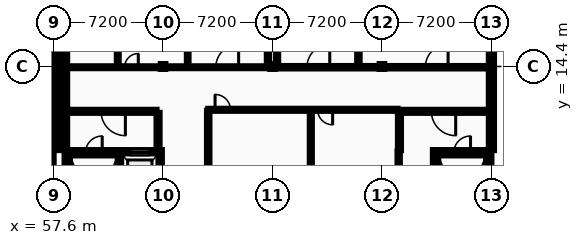
"""IFC4 building model, lengths in metres.
Left out: names, types, materials, properties, quantities, classifications, styles, units other than length and angle.
Written with IfcOpenShell. Run it as: python <this file> out.ifc"""

import sys

from ifc_helpers import new_model, si_unit, direction, frame, frame_2d, origin, origin_2d, place, context, subcontext, project, spatial, rectangle, i_section, extrude, element, fill, save


model = new_model("IFC4")
c1 = context("Model", 3, precision=1e-05, world=origin(), true_north=direction((0.0, 1.0)))
c2 = subcontext(c1, "Body", "Model", "MODEL_VIEW")
j1 = project(units=[si_unit("LENGTHUNIT", "METRE"), si_unit("PLANEANGLEUNIT", "RADIAN")], contexts=[c1])
p1 = place(None, origin())
s1 = spatial("IfcSite", under=j1, at=p1, CompositionType="ELEMENT")
p2 = place(p1, origin())
s2 = spatial("IfcBuilding", under=s1, at=p2, CompositionType="ELEMENT")
p3 = place(p2, frame((0.0, 0.0, 14.0)))
s3 = spatial("IfcBuildingStorey", under=s2, at=p3, CompositionType="ELEMENT", Elevation=14.0)
for number, where, z_axis, x_axis in (
    (1, (57.6, 14.4, 0.0), (0.0, 0.0, 1.0), (1.0, 0.0, 0.0)),
    (2, (58.32, 14.4, 0.0), (0.0, 0.0, 1.0), (1.0, 0.0, 0.0)),
    (3, (64.8, 14.4, 0.0), (0.0, 0.0, 1.0), (1.0, 0.0, 0.0)),
    (4, (72.0, 14.4, 0.0), (0.0, 0.0, 1.0), (1.0, 0.0, 0.0)),
    (5, (79.2, 14.4, 0.0), (0.0, 0.0, 1.0), (1.0, 0.0, 0.0)),
    (6, (86.4, 14.4, 0.0), (0.0, 0.0, 1.0), (1.0, 0.0, 0.0)),
):
    element("IfcColumn", number, at=place(p3, frame(where, z_axis=z_axis, x_axis=x_axis)), inside=s3, PredefinedType="COLUMN", context=c2, shape_type="SweptSolid", body=[
        extrude(i_section(OverallWidth=0.3, OverallDepth=0.32, WebThickness=0.011, FlangeThickness=0.021, FilletRadius=0.027, at=origin_2d()), origin(), (0.0, 0.0, 1.0), 4.4),
    ])
p4 = place(p3, frame((57.6, 8.9, 0.0), z_axis=(0.0, 0.0, 1.0), x_axis=(0.0, 1.0, 0.0)))
e7 = element("IfcWall", 7, at=p4, inside=s3, PredefinedType="STANDARD", context=c2, shape_type="SweptSolid", body=[
    extrude(rectangle(XDim=5.5, YDim=0.34, at=frame_2d((2.75, 0.0))), origin(), (0.0, 0.0, 1.0), 4.2),
])
p5 = place(p3, frame((57.6, 14.4, 0.0), z_axis=(0.0, 0.0, 1.0), x_axis=(0.0, 1.0, 0.0)))
e8 = element("IfcWall", 8, at=p5, inside=s3, PredefinedType="STANDARD", context=c2, shape_type="SweptSolid", body=[
    extrude(rectangle(XDim=7.37, YDim=0.34, at=frame_2d((3.685, 0.0))), origin(), (0.0, 0.0, 1.0), 3.895),
])
p6 = place(p5, frame((1.679, 0.0, 0.95)))
e9 = element("IfcOpeningElement", 9, at=p6, cuts=e8, PredefinedType="OPENING", context=c2, shape_type="SweptSolid", body=[
    extrude(rectangle(XDim=1.064, YDim=1.404, at=frame_2d((0.532, 0.702))), frame((0.0, 0.18, 0.0), z_axis=(0.0, -1.0, 0.0), x_axis=(1.0, 0.0, 0.0)), (0.0, 0.0, 1.0), 0.36),
])
p7 = place(p5, frame((4.627, 0.0, 0.95)))
e10 = element("IfcOpeningElement", 10, at=p7, cuts=e8, PredefinedType="OPENING", context=c2, shape_type="SweptSolid", body=[
    extrude(rectangle(XDim=1.064, YDim=1.404, at=frame_2d((0.532, 0.702))), frame((0.0, 0.18, 0.0), z_axis=(0.0, -1.0, 0.0), x_axis=(1.0, 0.0, 0.0)), (0.0, 0.0, 1.0), 0.36),
])
p8 = place(p3, frame((58.32, 14.4, 0.0), z_axis=(0.0, 0.0, 1.0), x_axis=(0.0, -1.0, 0.0)))
e11 = element("IfcWall", 11, at=p8, inside=s3, PredefinedType="STANDARD", context=c2, shape_type="SweptSolid", body=[
    extrude(rectangle(XDim=5.5, YDim=0.34, at=frame_2d((2.75, 0.0))), origin(), (0.0, 0.0, 1.0), 4.2),
])
p9 = place(p3, frame((58.32, 21.77, 0.0), z_axis=(0.0, 0.0, 1.0), x_axis=(0.0, -1.0, 0.0)))
e12 = element("IfcWall", 12, at=p9, inside=s3, PredefinedType="STANDARD", context=c2, shape_type="SweptSolid", body=[
    extrude(rectangle(XDim=7.37, YDim=0.34, at=frame_2d((3.685, 0.0))), origin(), (0.0, 0.0, 1.0), 3.895),
])
p10 = place(p9, frame((1.764, 0.0, 0.95)))
e13 = element("IfcOpeningElement", 13, at=p10, cuts=e12, PredefinedType="OPENING", context=c2, shape_type="SweptSolid", body=[
    extrude(rectangle(XDim=0.894, YDim=1.368, at=frame_2d((0.447, 0.684))), frame((0.0, 0.18, 0.0), z_axis=(0.0, -1.0, 0.0), x_axis=(1.0, 0.0, 0.0)), (0.0, 0.0, 1.0), 0.36),
])
p11 = place(p9, frame((4.712, 0.0, 0.95)))
e14 = element("IfcOpeningElement", 14, at=p11, cuts=e12, PredefinedType="OPENING", context=c2, shape_type="SweptSolid", body=[
    extrude(rectangle(XDim=0.894, YDim=1.368, at=frame_2d((0.447, 0.684))), frame((0.0, 0.18, 0.0), z_axis=(0.0, -1.0, 0.0), x_axis=(1.0, 0.0, 0.0)), (0.0, 0.0, 1.0), 0.36),
])
p12 = place(p3, frame((86.4, 8.9, 0.0), z_axis=(0.0, 0.0, 1.0), x_axis=(0.0, 1.0, 0.0)))
e15 = element("IfcWall", 15, at=p12, inside=s3, PredefinedType="STANDARD", context=c2, shape_type="SweptSolid", body=[
    extrude(rectangle(XDim=5.5, YDim=0.34, at=frame_2d((2.75, 0.0))), origin(), (0.0, 0.0, 1.0), 4.2),
])
p13 = place(p3, frame((86.4, 14.4, 0.0), z_axis=(0.0, 0.0, 1.0), x_axis=(0.0, 1.0, 0.0)))
e16 = element("IfcWall", 16, at=p13, inside=s3, PredefinedType="STANDARD", context=c2, shape_type="SweptSolid", body=[
    extrude(rectangle(XDim=7.03, YDim=0.34, at=frame_2d((3.515, 0.0))), origin(), (0.0, 0.0, 1.0), 3.885),
])
p14 = place(p13, frame((1.628, 0.0, 0.95)))
e17 = element("IfcOpeningElement", 17, at=p14, cuts=e16, PredefinedType="OPENING", context=c2, shape_type="SweptSolid", body=[
    extrude(rectangle(XDim=0.962, YDim=1.368, at=frame_2d((0.481, 0.684))), frame((0.0, 0.18, 0.0), z_axis=(0.0, -1.0, 0.0), x_axis=(1.0, 0.0, 0.0)), (0.0, 0.0, 1.0), 0.36),
])
p15 = place(p13, frame((4.44, 0.0, 0.95)))
e18 = element("IfcOpeningElement", 18, at=p15, cuts=e16, PredefinedType="OPENING", context=c2, shape_type="SweptSolid", body=[
    extrude(rectangle(XDim=0.962, YDim=1.368, at=frame_2d((0.481, 0.684))), frame((0.0, 0.18, 0.0), z_axis=(0.0, -1.0, 0.0), x_axis=(1.0, 0.0, 0.0)), (0.0, 0.0, 1.0), 0.36),
])
p16 = place(p3, frame((57.425, 0.4, 0.0), z_axis=(0.0, 0.0, 1.0), x_axis=(0.0, 1.0, 0.0)))
e19 = element("IfcWall", 19, at=p16, inside=s3, PredefinedType="SHEAR", context=c2, shape_type="SweptSolid", body=[
    extrude(rectangle(XDim=8.5, YDim=0.35, at=frame_2d((4.25, 0.0))), origin(), (0.0, 0.0, 1.0), 4.2),
])
p17 = place(p3, frame((58.67, 8.725, 0.0), z_axis=(0.0, 0.0, 1.0), x_axis=(1.0, 0.0, 0.0)))
e20 = element("IfcWall", 20, at=p17, inside=s3, PredefinedType="SHEAR", context=c2, shape_type="SweptSolid", body=[
    extrude(rectangle(XDim=3.15, YDim=0.35, at=frame_2d((1.575, 0.0))), origin(), (0.0, 0.0, 1.0), 4.2),
])
p18 = place(p17, frame((1.025, 0.0, 0.0)))
e21 = element("IfcOpeningElement", 21, at=p18, cuts=e20, PredefinedType="OPENING", context=c2, shape_type="SweptSolid", body=[
    extrude(rectangle(XDim=1.1, YDim=2.15, at=frame_2d((0.55, 1.075))), frame((0.0, 0.185, 0.0), z_axis=(0.0, -1.0, 0.0), x_axis=(1.0, 0.0, 0.0)), (0.0, 0.0, 1.0), 0.37),
])
for number, where, z_axis, x_axis in (
    (22, (58.495, 0.4, 0.0), (0.0, 0.0, 1.0), (0.0, 1.0, 0.0)),
    (23, (61.995, 0.4, 0.0), (0.0, 0.0, 1.0), (0.0, 1.0, 0.0)),
):
    element("IfcWall", number, at=place(p3, frame(where, z_axis=z_axis, x_axis=x_axis)), inside=s3, PredefinedType="SHEAR", context=c2, shape_type="SweptSolid", body=[
        extrude(rectangle(XDim=8.5, YDim=0.35, at=frame_2d((4.25, 0.0))), origin(), (0.0, 0.0, 1.0), 4.2),
    ])
p19 = place(p3, frame((62.17, 8.725, 0.0), z_axis=(0.0, 0.0, 1.0), x_axis=(1.0, 0.0, 0.0)))
e24 = element("IfcWall", 24, at=p19, inside=s3, PredefinedType="SHEAR", context=c2, shape_type="SweptSolid", body=[
    extrude(rectangle(XDim=2.2, YDim=0.35, at=frame_2d((1.1, 0.0))), origin(), (0.0, 0.0, 1.0), 4.2),
])
p20 = place(p19, frame((0.5, 0.0, 0.0)))
e25 = element("IfcOpeningElement", 25, at=p20, cuts=e24, PredefinedType="OPENING", context=c2, shape_type="SweptSolid", body=[
    extrude(rectangle(XDim=1.2, YDim=2.2, at=frame_2d((0.6, 1.1))), frame((0.0, 0.185, 0.0), z_axis=(0.0, -1.0, 0.0), x_axis=(1.0, 0.0, 0.0)), (0.0, 0.0, 1.0), 0.37),
])
p21 = place(p3, frame((64.545, 5.2, 0.0), z_axis=(0.0, 0.0, 1.0), x_axis=(0.0, 1.0, 0.0)))
e26 = element("IfcWall", 26, at=p21, inside=s3, PredefinedType="SHEAR", context=c2, shape_type="SweptSolid", body=[
    extrude(rectangle(XDim=3.7, YDim=0.35, at=frame_2d((1.85, 0.0))), origin(), (0.0, 0.0, 1.0), 4.2),
])
p22 = place(p3, frame((58.67, 11.45, 0.0), z_axis=(0.0, 0.0, 1.0), x_axis=(1.0, 0.0, 0.0)))
e27 = element("IfcWall", 27, at=p22, inside=s3, PredefinedType="PARTITIONING", context=c2, shape_type="SweptSolid", body=[
    extrude(rectangle(XDim=5.7, YDim=0.2, at=frame_2d((2.85, 0.0))), origin(), (0.0, 0.0, 1.0), 4.2),
])
p23 = place(p22, frame((2.05, 0.0, 0.0)))
e28 = element("IfcOpeningElement", 28, at=p23, cuts=e27, PredefinedType="OPENING", context=c2, shape_type="SweptSolid", body=[
    extrude(rectangle(XDim=1.6, YDim=2.2, at=frame_2d((0.8, 1.1))), frame((0.0, 0.11, 0.0), z_axis=(0.0, -1.0, 0.0), x_axis=(1.0, 0.0, 0.0)), (0.0, 0.0, 1.0), 0.22),
])
p24 = place(p3, frame((64.47, 8.9, 0.0), z_axis=(0.0, 0.0, 1.0), x_axis=(0.0, 1.0, 0.0)))
e29 = element("IfcWall", 29, at=p24, inside=s3, PredefinedType="PARTITIONING", context=c2, shape_type="SweptSolid", body=[
    extrude(rectangle(XDim=2.45, YDim=0.2, at=frame_2d((1.225, 0.0))), origin(), (0.0, 0.0, 1.0), 4.2),
])
p25 = place(p3, frame((82.9, 8.725, 0.0), z_axis=(0.0, 0.0, 1.0), x_axis=(1.0, 0.0, 0.0)))
e30 = element("IfcWall", 30, at=p25, inside=s3, PredefinedType="SHEAR", context=c2, shape_type="SweptSolid", body=[
    extrude(rectangle(XDim=3.15, YDim=0.35, at=frame_2d((1.575, 0.0))), origin(), (0.0, 0.0, 1.0), 4.2),
])
p26 = place(p25, frame((1.025, 0.0, 0.0)))
e31 = element("IfcOpeningElement", 31, at=p26, cuts=e30, PredefinedType="OPENING", context=c2, shape_type="SweptSolid", body=[
    extrude(rectangle(XDim=1.1, YDim=2.15, at=frame_2d((0.55, 1.075))), frame((0.0, 0.185, 0.0), z_axis=(0.0, -1.0, 0.0), x_axis=(1.0, 0.0, 0.0)), (0.0, 0.0, 1.0), 0.37),
])
for number, where, z_axis, x_axis in (
    (32, (82.725, 0.17, 0.0), (0.0, 0.0, 1.0), (0.0, 1.0, 0.0)),
    (33, (86.225, 0.17, 0.0), (0.0, 0.0, 1.0), (0.0, 1.0, 0.0)),
):
    element("IfcWall", number, at=place(p3, frame(where, z_axis=z_axis, x_axis=x_axis)), inside=s3, PredefinedType="SHEAR", context=c2, shape_type="SweptSolid", body=[
        extrude(rectangle(XDim=8.73, YDim=0.35, at=frame_2d((4.365, 0.0))), origin(), (0.0, 0.0, 1.0), 4.2),
    ])
p27 = place(p3, frame((80.45, 11.45, 0.0), z_axis=(0.0, 0.0, 1.0), x_axis=(1.0, 0.0, 0.0)))
e34 = element("IfcWall", 34, at=p27, inside=s3, PredefinedType="PARTITIONING", context=c2, shape_type="SweptSolid", body=[
    extrude(rectangle(XDim=5.6, YDim=0.2, at=frame_2d((2.8, 0.0))), origin(), (0.0, 0.0, 1.0), 4.2),
])
p28 = place(p27, frame((2.0, 0.0, 0.0)))
e35 = element("IfcOpeningElement", 35, at=p28, cuts=e34, PredefinedType="OPENING", context=c2, shape_type="SweptSolid", body=[
    extrude(rectangle(XDim=1.6, YDim=2.2, at=frame_2d((0.8, 1.1))), frame((0.0, 0.11, 0.0), z_axis=(0.0, -1.0, 0.0), x_axis=(1.0, 0.0, 0.0)), (0.0, 0.0, 1.0), 0.22),
])
p29 = place(p3, frame((80.35, 8.9, 0.0), z_axis=(0.0, 0.0, 1.0), x_axis=(0.0, 1.0, 0.0)))
e36 = element("IfcWall", 36, at=p29, inside=s3, PredefinedType="PARTITIONING", context=c2, shape_type="SweptSolid", body=[
    extrude(rectangle(XDim=2.45, YDim=0.2, at=frame_2d((1.225, 0.0))), origin(), (0.0, 0.0, 1.0), 4.2),
])
p30 = place(p3, frame((67.77, 11.55, 0.0), z_axis=(0.0, 0.0, 1.0), x_axis=(1.0, 0.0, 0.0)))
e37 = element("IfcWall", 37, at=p30, inside=s3, PredefinedType="PARTITIONING", context=c2, shape_type="SweptSolid", body=[
    extrude(rectangle(XDim=12.46, YDim=0.135, at=frame_2d((6.23, 0.0))), origin(), (0.0, 0.0, 1.0), 4.2),
])
p31 = place(p30, frame((7.2, 0.0, 0.0)))
e38 = element("IfcOpeningElement", 38, at=p31, cuts=e37, PredefinedType="OPENING", context=c2, shape_type="SweptSolid", body=[
    extrude(rectangle(XDim=0.984, YDim=2.04, at=frame_2d((0.492, 1.02))), frame((0.0, 0.078, 0.0), z_axis=(0.0, -1.0, 0.0), x_axis=(1.0, 0.0, 0.0)), (0.0, 0.0, 1.0), 0.155),
])
p32 = place(p30, frame((0.45, 0.0, 0.0)))
e39 = element("IfcOpeningElement", 39, at=p32, cuts=e37, PredefinedType="OPENING", context=c2, shape_type="SweptSolid", body=[
    extrude(rectangle(XDim=1.01, YDim=2.04, at=frame_2d((0.505, 1.02))), frame((0.0, 0.078, 0.0), z_axis=(0.0, -1.0, 0.0), x_axis=(1.0, 0.0, 0.0)), (0.0, 0.0, 1.0), 0.155),
])
p33 = place(p3, frame((58.7, 14.35, 0.0), z_axis=(0.0, 0.0, 1.0), x_axis=(1.0, 0.0, 0.0)))
e40 = element("IfcWall", 40, at=p33, inside=s3, PredefinedType="PARTITIONING", context=c2, shape_type="SweptSolid", body=[
    extrude(rectangle(XDim=5.72, YDim=0.125, at=frame_2d((2.86, 0.0))), origin(), (0.0, 0.0, 1.0), 3.935),
])
p34 = place(p33, frame((1.67, 0.0, 0.0)))
e41 = element("IfcOpeningElement", 41, at=p34, cuts=e40, PredefinedType="OPENING", context=c2, shape_type="SweptSolid", body=[
    extrude(rectangle(XDim=1.0, YDim=2.1, at=frame_2d((0.5, 1.05))), frame((0.0, 0.073, 0.0), z_axis=(0.0, -1.0, 0.0), x_axis=(1.0, 0.0, 0.0)), (0.0, 0.0, 1.0), 0.145),
])
p35 = place(p33, frame((3.57, 0.0, 0.0)))
e42 = element("IfcOpeningElement", 42, at=p35, cuts=e40, PredefinedType="OPENING", context=c2, shape_type="SweptSolid", body=[
    extrude(rectangle(XDim=0.9, YDim=2.1, at=frame_2d((0.45, 1.05))), frame((0.0, 0.073, 0.0), z_axis=(0.0, -1.0, 0.0), x_axis=(1.0, 0.0, 0.0)), (0.0, 0.0, 1.0), 0.145),
])
p36 = place(p3, frame((65.18, 14.35, 0.0), z_axis=(0.0, 0.0, 1.0), x_axis=(1.0, 0.0, 0.0)))
e43 = element("IfcWall", 43, at=p36, inside=s3, PredefinedType="PARTITIONING", context=c2, shape_type="SweptSolid", body=[
    extrude(rectangle(XDim=6.44, YDim=0.125, at=frame_2d((3.22, 0.0))), origin(), (0.0, 0.0, 1.0), 3.935),
])
p37 = place(p36, frame((3.09, 0.0, 0.0)))
e44 = element("IfcOpeningElement", 44, at=p37, cuts=e43, PredefinedType="OPENING", context=c2, shape_type="SweptSolid", body=[
    extrude(rectangle(XDim=1.5, YDim=2.2, at=frame_2d((0.75, 1.1))), frame((0.0, 0.073, 0.0), z_axis=(0.0, -1.0, 0.0), x_axis=(1.0, 0.0, 0.0)), (0.0, 0.0, 1.0), 0.145),
])
p38 = place(p3, frame((72.38, 14.35, 0.0), z_axis=(0.0, 0.0, 1.0), x_axis=(1.0, 0.0, 0.0)))
e45 = element("IfcWall", 45, at=p38, inside=s3, PredefinedType="PARTITIONING", context=c2, shape_type="SweptSolid", body=[
    extrude(rectangle(XDim=6.44, YDim=0.16, at=frame_2d((3.22, 0.0))), origin(), (0.0, 0.0, 1.0), 3.935),
])
p39 = place(p38, frame((1.885, 0.0, 0.0)))
e46 = element("IfcOpeningElement", 46, at=p39, cuts=e45, PredefinedType="OPENING", context=c2, shape_type="SweptSolid", body=[
    extrude(rectangle(XDim=1.5, YDim=2.2, at=frame_2d((0.75, 1.1))), frame((0.0, 0.09, 0.0), z_axis=(0.0, -1.0, 0.0), x_axis=(1.0, 0.0, 0.0)), (0.0, 0.0, 1.0), 0.18),
])
p40 = place(p3, frame((79.58, 14.35, 0.0), z_axis=(0.0, 0.0, 1.0), x_axis=(1.0, 0.0, 0.0)))
e47 = element("IfcWall", 47, at=p40, inside=s3, PredefinedType="PARTITIONING", context=c2, shape_type="SweptSolid", body=[
    extrude(rectangle(XDim=6.44, YDim=0.16, at=frame_2d((3.22, 0.0))), origin(), (0.0, 0.0, 1.0), 3.935),
])
p41 = place(p40, frame((2.47, 0.0, 0.0)))
e48 = element("IfcOpeningElement", 48, at=p41, cuts=e47, PredefinedType="OPENING", context=c2, shape_type="SweptSolid", body=[
    extrude(rectangle(XDim=1.5, YDim=2.2, at=frame_2d((0.75, 1.1))), frame((0.0, 0.09, 0.0), z_axis=(0.0, -1.0, 0.0), x_axis=(1.0, 0.0, 0.0)), (0.0, 0.0, 1.0), 0.18),
])
p42 = place(p3, frame((61.82, 14.413, 0.0), z_axis=(0.0, 0.0, 1.0), x_axis=(0.0, 1.0, 0.0)))
e49 = element("IfcWall", 49, at=p42, inside=s3, PredefinedType="PARTITIONING", context=c2, shape_type="SweptSolid", body=[
    extrude(rectangle(XDim=6.987, YDim=0.125, at=frame_2d((3.494, 0.0))), origin(), (0.0, 0.0, 1.0), 4.2),
])
p43 = place(p3, frame((66.42, 14.413, 0.0), z_axis=(0.0, 0.0, 1.0), x_axis=(0.0, 1.0, 0.0)))
e50 = element("IfcWall", 50, at=p43, inside=s3, PredefinedType="PARTITIONING", context=c2, shape_type="SweptSolid", body=[
    extrude(rectangle(XDim=6.932, YDim=0.11, at=frame_2d((3.466, 0.0))), origin(), (0.0, 0.0, 1.0), 4.2),
])
p44 = place(p3, frame((67.77, 3.36, 0.0), z_axis=(0.0, 0.0, 1.0), x_axis=(0.0, 1.0, 0.0)))
e51 = element("IfcWall", 51, at=p44, inside=s3, PredefinedType="PARTITIONING", context=c2, shape_type="SweptSolid", body=[
    extrude(rectangle(XDim=8.122, YDim=0.16, at=frame_2d((4.061, 0.0))), origin(), (0.0, 0.0, 1.0), 4.2),
])
p45 = place(p3, frame((71.7, 14.78, 0.0), z_axis=(0.0, 0.0, 1.0), x_axis=(0.0, 1.0, 0.0)))
e52 = element("IfcWall", 52, at=p45, inside=s3, PredefinedType="PARTITIONING", context=c2, shape_type="SweptSolid", body=[
    extrude(rectangle(XDim=6.44, YDim=0.15, at=frame_2d((3.22, 0.0))), origin(), (0.0, 0.0, 1.0), 3.895),
])
p46 = place(p3, frame((72.3, 14.78, 0.0), z_axis=(0.0, 0.0, 1.0), x_axis=(0.0, 1.0, 0.0)))
e53 = element("IfcWall", 53, at=p46, inside=s3, PredefinedType="PARTITIONING", context=c2, shape_type="SweptSolid", body=[
    extrude(rectangle(XDim=6.44, YDim=0.142, at=frame_2d((3.22, 0.0))), origin(), (0.0, 0.0, 1.0), 3.895),
])
p47 = place(p3, frame((74.52, 0.2, 0.0), z_axis=(0.0, 0.0, 1.0), x_axis=(0.0, 1.0, 0.0)))
e54 = element("IfcWall", 54, at=p47, inside=s3, PredefinedType="PARTITIONING", context=c2, shape_type="SweptSolid", body=[
    extrude(rectangle(XDim=11.282, YDim=0.135, at=frame_2d((5.641, 0.0))), origin(), (0.0, 0.0, 1.0), 3.945),
])
p48 = place(p3, frame((77.65, 14.43, 0.0), z_axis=(0.0, 0.0, 1.0), x_axis=(0.0, 1.0, 0.0)))
e55 = element("IfcWall", 55, at=p48, inside=s3, PredefinedType="PARTITIONING", context=c2, shape_type="SweptSolid", body=[
    extrude(rectangle(XDim=6.89, YDim=0.16, at=frame_2d((3.445, 0.0))), origin(), (0.0, 0.0, 1.0), 4.2),
])
p49 = place(p3, frame((80.3, 0.2, 0.0), z_axis=(0.0, 0.0, 1.0), x_axis=(0.0, 1.0, 0.0)))
e56 = element("IfcWall", 56, at=p49, inside=s3, PredefinedType="PARTITIONING", context=c2, shape_type="SweptSolid", body=[
    extrude(rectangle(XDim=8.6, YDim=0.15, at=frame_2d((4.3, 0.0))), origin(), (0.0, 0.0, 1.0), 4.2),
])
p50 = place(p18, frame((1.1, 0.0, 0.0), z_axis=(0.0, 0.0, 1.0), x_axis=(-1.0, 0.0, 0.0)))
e57 = element("IfcDoor", 57, at=p50, inside=s3, OperationType="SINGLE_SWING_RIGHT", PredefinedType="DOOR", context=c2, shape_type="SweptSolid", body=[
    extrude(rectangle(XDim=1.1, YDim=2.15, at=frame_2d((0.55, 1.075))), frame((0.0, 0.025, 0.0), z_axis=(0.0, -1.0, 0.0), x_axis=(1.0, 0.0, 0.0)), (0.0, 0.0, 1.0), 0.05),
])
fill(e21, e57)
p51 = place(p20, origin())
e58 = element("IfcDoor", 58, at=p51, inside=s3, OperationType="SLIDING_TO_RIGHT", PredefinedType="DOOR", context=c2, shape_type="SweptSolid", body=[
    extrude(rectangle(XDim=1.2, YDim=2.2, at=frame_2d((0.6, 1.1))), frame((0.0, 0.025, 0.0), z_axis=(0.0, -1.0, 0.0), x_axis=(1.0, 0.0, 0.0)), (0.0, 0.0, 1.0), 0.05),
])
fill(e25, e58)
p52 = place(p23, origin())
e59 = element("IfcDoor", 59, at=p52, inside=s3, OperationType="DOUBLE_DOOR_SINGLE_SWING", PredefinedType="DOOR", context=c2, shape_type="SweptSolid", body=[
    extrude(rectangle(XDim=1.6, YDim=2.2, at=frame_2d((0.8, 1.1))), frame((0.0, 0.025, 0.0), z_axis=(0.0, -1.0, 0.0), x_axis=(1.0, 0.0, 0.0)), (0.0, 0.0, 1.0), 0.05),
])
fill(e28, e59)
p53 = place(p26, frame((1.1, 0.0, 0.0), z_axis=(0.0, 0.0, 1.0), x_axis=(-1.0, 0.0, 0.0)))
e60 = element("IfcDoor", 60, at=p53, inside=s3, OperationType="SINGLE_SWING_RIGHT", PredefinedType="DOOR", context=c2, shape_type="SweptSolid", body=[
    extrude(rectangle(XDim=1.1, YDim=2.15, at=frame_2d((0.55, 1.075))), frame((0.0, 0.025, 0.0), z_axis=(0.0, -1.0, 0.0), x_axis=(1.0, 0.0, 0.0)), (0.0, 0.0, 1.0), 0.05),
])
fill(e31, e60)
p54 = place(p28, origin())
e61 = element("IfcDoor", 61, at=p54, inside=s3, OperationType="DOUBLE_DOOR_SINGLE_SWING", PredefinedType="DOOR", context=c2, shape_type="SweptSolid", body=[
    extrude(rectangle(XDim=1.6, YDim=2.2, at=frame_2d((0.8, 1.1))), frame((0.0, 0.025, 0.0), z_axis=(0.0, -1.0, 0.0), x_axis=(1.0, 0.0, 0.0)), (0.0, 0.0, 1.0), 0.05),
])
fill(e35, e61)
p55 = place(p34, frame((1.0, 0.0, 0.0), z_axis=(0.0, 0.0, 1.0), x_axis=(-1.0, 0.0, 0.0)))
e62 = element("IfcDoor", 62, at=p55, inside=s3, OperationType="SLIDING_TO_LEFT", PredefinedType="DOOR", context=c2, shape_type="SweptSolid", body=[
    extrude(rectangle(XDim=1.0, YDim=2.1, at=frame_2d((0.5, 1.05))), frame((0.0, 0.025, 0.0), z_axis=(0.0, -1.0, 0.0), x_axis=(1.0, 0.0, 0.0)), (0.0, 0.0, 1.0), 0.05),
])
fill(e41, e62)
p56 = place(p35, frame((0.9, 0.0, 0.0), z_axis=(0.0, 0.0, 1.0), x_axis=(-1.0, 0.0, 0.0)))
e63 = element("IfcDoor", 63, at=p56, inside=s3, OperationType="SINGLE_SWING_RIGHT", PredefinedType="DOOR", context=c2, shape_type="SweptSolid", body=[
    extrude(rectangle(XDim=0.9, YDim=2.1, at=frame_2d((0.45, 1.05))), frame((0.0, 0.025, 0.0), z_axis=(0.0, -1.0, 0.0), x_axis=(1.0, 0.0, 0.0)), (0.0, 0.0, 1.0), 0.05),
])
fill(e42, e63)
p57 = place(p37, frame((1.5, 0.0, 0.0), z_axis=(0.0, 0.0, 1.0), x_axis=(-1.0, 0.0, 0.0)))
e64 = element("IfcDoor", 64, at=p57, inside=s3, OperationType="DOUBLE_DOOR_SINGLE_SWING", PredefinedType="DOOR", context=c2, shape_type="SweptSolid", body=[
    extrude(rectangle(XDim=1.5, YDim=2.2, at=frame_2d((0.75, 1.1))), frame((0.0, 0.025, 0.0), z_axis=(0.0, -1.0, 0.0), x_axis=(1.0, 0.0, 0.0)), (0.0, 0.0, 1.0), 0.05),
])
fill(e44, e64)
p58 = place(p39, frame((1.5, 0.0, 0.0), z_axis=(0.0, 0.0, 1.0), x_axis=(-1.0, 0.0, 0.0)))
e65 = element("IfcDoor", 65, at=p58, inside=s3, OperationType="DOUBLE_DOOR_SINGLE_SWING", PredefinedType="DOOR", context=c2, shape_type="SweptSolid", body=[
    extrude(rectangle(XDim=1.5, YDim=2.2, at=frame_2d((0.75, 1.1))), frame((0.0, 0.025, 0.0), z_axis=(0.0, -1.0, 0.0), x_axis=(1.0, 0.0, 0.0)), (0.0, 0.0, 1.0), 0.05),
])
fill(e46, e65)
p59 = place(p41, frame((1.5, 0.0, 0.0), z_axis=(0.0, 0.0, 1.0), x_axis=(-1.0, 0.0, 0.0)))
e66 = element("IfcDoor", 66, at=p59, inside=s3, OperationType="DOUBLE_DOOR_SINGLE_SWING", PredefinedType="DOOR", context=c2, shape_type="SweptSolid", body=[
    extrude(rectangle(XDim=1.5, YDim=2.2, at=frame_2d((0.75, 1.1))), frame((0.0, 0.025, 0.0), z_axis=(0.0, -1.0, 0.0), x_axis=(1.0, 0.0, 0.0)), (0.0, 0.0, 1.0), 0.05),
])
fill(e48, e66)
p60 = place(p31, origin())
e67 = element("IfcDoor", 67, at=p60, inside=s3, OperationType="SINGLE_SWING_RIGHT", PredefinedType="DOOR", context=c2, shape_type="SweptSolid", body=[
    extrude(rectangle(XDim=0.984, YDim=2.04, at=frame_2d((0.492, 1.02))), frame((0.0, 0.025, 0.0), z_axis=(0.0, -1.0, 0.0), x_axis=(1.0, 0.0, 0.0)), (0.0, 0.0, 1.0), 0.05),
])
fill(e38, e67)
p61 = place(p32, origin())
e68 = element("IfcDoor", 68, at=p61, inside=s3, OperationType="SINGLE_SWING_LEFT", PredefinedType="DOOR", context=c2, shape_type="SweptSolid", body=[
    extrude(rectangle(XDim=1.01, YDim=2.04, at=frame_2d((0.505, 1.02))), frame((0.0, 0.025, 0.0), z_axis=(0.0, -1.0, 0.0), x_axis=(1.0, 0.0, 0.0)), (0.0, 0.0, 1.0), 0.05),
])
fill(e39, e68)
save(model, sys.argv[1])
